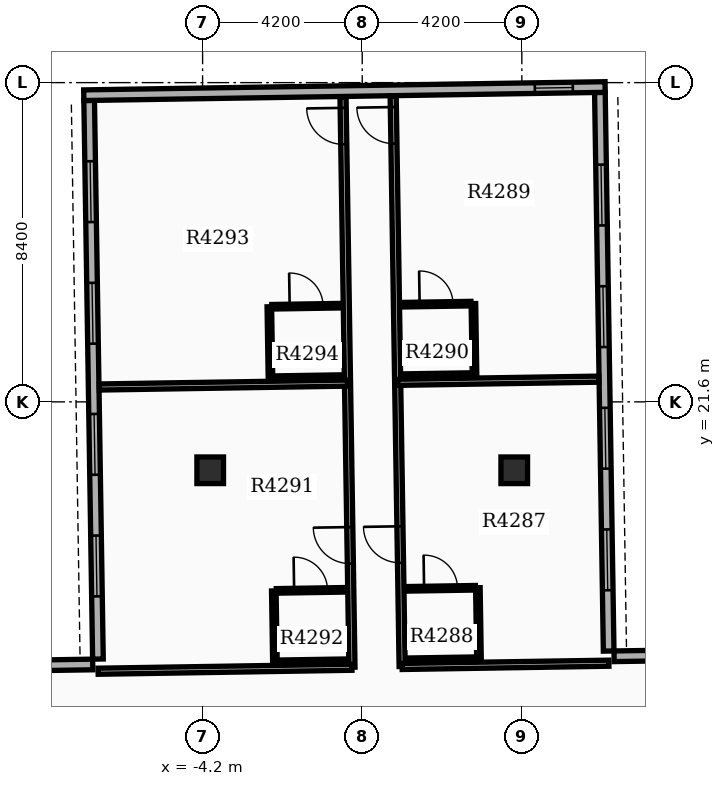
"""IFC4 building model, lengths in metres.
Left out: names, types, materials, properties, quantities, classifications, styles, units other than length and angle.
Written with IfcOpenShell. Run it as: python <this file> out.ifc"""

import sys

from ifc_helpers import new_model, si_unit, direction, frame, frame_2d, origin, origin_2d, place, context, subcontext, project, spatial, rectangle, extrude, element, fill, save


model = new_model("IFC4")
c1 = context("Model", 3, precision=1e-05, world=origin(), true_north=direction((0.0, 1.0)))
c2 = subcontext(c1, "Body", "Model", "MODEL_VIEW")
j1 = project(units=[si_unit("LENGTHUNIT", "METRE"), si_unit("PLANEANGLEUNIT", "RADIAN")], contexts=[c1])
p1 = place(None, origin())
s1 = spatial("IfcSite", under=j1, at=p1, CompositionType="ELEMENT")
p2 = place(p1, origin())
s2 = spatial("IfcBuilding", under=s1, at=p2, CompositionType="ELEMENT")
p3 = place(p2, frame((0.0, 0.0, 269.4)))
s3 = spatial("IfcBuildingStorey", under=s2, at=p3, CompositionType="ELEMENT", Elevation=269.4)
for number, where, z_axis, x_axis in (
    (1, (-4.0, 19.8, 0.0), (0.0, 0.0, 1.0), (1.0, 0.0, 0.0)),
    (2, (4.0, 19.8, 0.0), (0.0, 0.0, 1.0), (1.0, 0.0, 0.0)),
):
    element("IfcColumn", number, at=place(p3, frame(where, z_axis=z_axis, x_axis=x_axis)), inside=s3, PredefinedType="COLUMN", context=c2, shape_type="SweptSolid", body=[
        extrude(rectangle(XDim=0.7, YDim=0.7, at=origin_2d()), origin(), (0.0, 0.0, 1.0), 3.9),
    ])
p4 = place(p3, frame((6.485, 15.044, 0.0), z_axis=(0.0, 0.0, 1.0), x_axis=(-0.015711302158, 0.999876569875, 0.0)))
e3 = element("IfcWall", 3, at=p4, inside=s3, PredefinedType="STANDARD", context=c2, shape_type="SweptSolid", body=[
    extrude(rectangle(XDim=14.7, YDim=0.28, at=frame_2d((7.35, 0.0))), origin(), (0.0, 0.0, 1.0), 3.18),
])
p5 = place(p4, frame((1.6, 0.0, 0.8)))
e4 = element("IfcOpeningElement", 4, at=p5, cuts=e3, PredefinedType="OPENING", context=c2, shape_type="SweptSolid", body=[
    extrude(rectangle(XDim=1.6, YDim=1.7, at=frame_2d((0.8, 0.85))), frame((0.0, 0.15, 0.0), z_axis=(0.0, -1.0, 0.0), x_axis=(1.0, 0.0, 0.0)), (0.0, 0.0, 1.0), 0.3),
])
p6 = place(p4, frame((4.8, 0.0, 0.8)))
e5 = element("IfcOpeningElement", 5, at=p6, cuts=e3, PredefinedType="OPENING", context=c2, shape_type="SweptSolid", body=[
    extrude(rectangle(XDim=1.6, YDim=1.7, at=frame_2d((0.8, 0.85))), frame((0.0, 0.15, 0.0), z_axis=(0.0, -1.0, 0.0), x_axis=(1.0, 0.0, 0.0)), (0.0, 0.0, 1.0), 0.3),
])
p7 = place(p4, frame((8.0, 0.0, 0.8)))
e6 = element("IfcOpeningElement", 6, at=p7, cuts=e3, PredefinedType="OPENING", context=c2, shape_type="SweptSolid", body=[
    extrude(rectangle(XDim=1.6, YDim=1.7, at=frame_2d((0.8, 0.85))), frame((0.0, 0.15, 0.0), z_axis=(0.0, -1.0, 0.0), x_axis=(1.0, 0.0, 0.0)), (0.0, 0.0, 1.0), 0.3),
])
p8 = place(p4, frame((11.2, 0.0, 0.8)))
e7 = element("IfcOpeningElement", 7, at=p8, cuts=e3, PredefinedType="OPENING", context=c2, shape_type="SweptSolid", body=[
    extrude(rectangle(XDim=1.6, YDim=1.7, at=frame_2d((0.8, 0.85))), frame((0.0, 0.15, 0.0), z_axis=(0.0, -1.0, 0.0), x_axis=(1.0, 0.0, 0.0)), (0.0, 0.0, 1.0), 0.3),
])
p9 = place(p3, frame((-7.185, 29.531, 0.0), z_axis=(0.0, 0.0, 1.0), x_axis=(0.015711302158, -0.999876569875, 0.0)))
e8 = element("IfcWall", 8, at=p9, inside=s3, PredefinedType="STANDARD", context=c2, shape_type="SweptSolid", body=[
    extrude(rectangle(XDim=14.7, YDim=0.28, at=frame_2d((7.35, 0.0))), origin(), (0.0, 0.0, 1.0), 3.18),
])
p10 = place(p9, frame((1.6, 0.0, 0.8)))
e9 = element("IfcOpeningElement", 9, at=p10, cuts=e8, PredefinedType="OPENING", context=c2, shape_type="SweptSolid", body=[
    extrude(rectangle(XDim=1.6, YDim=1.7, at=frame_2d((0.8, 0.85))), frame((0.0, 0.15, 0.0), z_axis=(0.0, -1.0, 0.0), x_axis=(1.0, 0.0, 0.0)), (0.0, 0.0, 1.0), 0.3),
])
p11 = place(p9, frame((4.8, 0.0, 0.8)))
e10 = element("IfcOpeningElement", 10, at=p11, cuts=e8, PredefinedType="OPENING", context=c2, shape_type="SweptSolid", body=[
    extrude(rectangle(XDim=1.6, YDim=1.7, at=frame_2d((0.8, 0.85))), frame((0.0, 0.15, 0.0), z_axis=(0.0, -1.0, 0.0), x_axis=(1.0, 0.0, 0.0)), (0.0, 0.0, 1.0), 0.3),
])
p12 = place(p9, frame((8.25, 0.0, 0.8)))
e11 = element("IfcOpeningElement", 11, at=p12, cuts=e8, PredefinedType="OPENING", context=c2, shape_type="SweptSolid", body=[
    extrude(rectangle(XDim=1.6, YDim=1.7, at=frame_2d((0.8, 0.85))), frame((0.0, 0.15, 0.0), z_axis=(0.0, -1.0, 0.0), x_axis=(1.0, 0.0, 0.0)), (0.0, 0.0, 1.0), 0.3),
])
p13 = place(p9, frame((11.45, 0.0, 0.8)))
e12 = element("IfcOpeningElement", 12, at=p13, cuts=e8, PredefinedType="OPENING", context=c2, shape_type="SweptSolid", body=[
    extrude(rectangle(XDim=1.6, YDim=1.7, at=frame_2d((0.8, 0.85))), frame((0.0, 0.15, 0.0), z_axis=(0.0, -1.0, 0.0), x_axis=(1.0, 0.0, 0.0)), (0.0, 0.0, 1.0), 0.3),
])
p14 = place(p3, frame((6.391, 29.884, 0.0), z_axis=(0.0, 0.0, 1.0), x_axis=(-0.999876828887, -0.015694809807, 0.0)))
e13 = element("IfcWall", 13, at=p14, inside=s3, PredefinedType="STANDARD", context=c2, shape_type="SweptSolid", body=[
    extrude(rectangle(XDim=13.72, YDim=0.28, at=frame_2d((6.86, 0.0))), origin(), (0.0, 0.0, 1.0), 3.18),
])
p15 = place(p14, frame((0.85, 0.0, 0.85)))
e14 = element("IfcOpeningElement", 14, at=p15, cuts=e13, PredefinedType="OPENING", context=c2, shape_type="SweptSolid", body=[
    extrude(rectangle(XDim=1.0, YDim=1.5, at=frame_2d((0.5, 0.75))), frame((0.0, 0.15, 0.0), z_axis=(0.0, -1.0, 0.0), x_axis=(1.0, 0.0, 0.0)), (0.0, 0.0, 1.0), 0.3),
])
p16 = place(p3, frame((12.926, 15.005, 0.0), z_axis=(0.0, 0.0, 1.0), x_axis=(-0.999876823822, -0.015695132501, 0.0)))
e15 = element("IfcWall", 15, at=p16, inside=s3, PredefinedType="STANDARD", context=c2, shape_type="SweptSolid", body=[
    extrude(rectangle(XDim=6.3, YDim=0.28, at=frame_2d((3.15, 0.0))), origin(), (0.0, 0.0, 1.0), 3.18),
])
p17 = place(p3, frame((-13.391, 14.592, 0.0), z_axis=(0.0, 0.0, 1.0), x_axis=(0.999876833368, 0.015694524359, 0.0)))
e16 = element("IfcWall", 16, at=p17, inside=s3, PredefinedType="STANDARD", context=c2, shape_type="SweptSolid", body=[
    extrude(rectangle(XDim=6.3, YDim=0.28, at=frame_2d((3.15, 0.0))), origin(), (0.0, 0.0, 1.0), 3.18),
])
p18 = place(p3, frame((1.05, 14.638, 0.0), z_axis=(0.0, 0.0, 1.0), x_axis=(-0.015709976686, 0.999876590701, 0.0)))
e17 = element("IfcWall", 17, at=p18, inside=s3, PredefinedType="PARTITIONING", context=c2, shape_type="SweptSolid", body=[
    extrude(rectangle(XDim=15.012, YDim=0.16, at=frame_2d((7.506, 0.0))), origin(), (0.0, 0.0, 1.0), 3.17),
])
p19 = place(p18, frame((2.728, 0.0, 0.0)))
e18 = element("IfcOpeningElement", 18, at=p19, cuts=e17, PredefinedType="OPENING", context=c2, shape_type="SweptSolid", body=[
    extrude(rectangle(XDim=0.96, YDim=2.15, at=frame_2d((0.48, 1.075))), frame((0.0, 0.09, 0.0), z_axis=(0.0, -1.0, 0.0), x_axis=(1.0, 0.0, 0.0)), (0.0, 0.0, 1.0), 0.18),
])
p20 = place(p18, frame((13.76, 0.0, 0.0)))
e19 = element("IfcOpeningElement", 19, at=p20, cuts=e17, PredefinedType="OPENING", context=c2, shape_type="SweptSolid", body=[
    extrude(rectangle(XDim=0.96, YDim=2.15, at=frame_2d((0.48, 1.075))), frame((0.0, 0.09, 0.0), z_axis=(0.0, -1.0, 0.0), x_axis=(1.0, 0.0, 0.0)), (0.0, 0.0, 1.0), 0.18),
])
p21 = place(p3, frame((1.05, 14.638, 0.0), z_axis=(0.0, 0.0, 1.0), x_axis=(0.999876622965, 0.015707923068, 0.0)))
e20 = element("IfcWall", 20, at=p21, inside=s3, PredefinedType="PARTITIONING", context=c2, shape_type="SweptSolid", body=[
    extrude(rectangle(XDim=5.44, YDim=0.16, at=frame_2d((2.72, 0.0))), origin(), (0.0, 0.0, 1.0), 3.17),
])
p22 = place(p3, frame((0.933, 22.115, 0.0), z_axis=(0.0, 0.0, 1.0), x_axis=(0.999876970397, 0.015685791996, 0.0)))
e21 = element("IfcWall", 21, at=p22, inside=s3, PredefinedType="PARTITIONING", context=c2, shape_type="SweptSolid", body=[
    extrude(rectangle(XDim=5.292, YDim=0.16, at=frame_2d((2.646, 0.0))), origin(), (0.0, 0.0, 1.0), 3.17),
])
p23 = place(p3, frame((1.158, 16.68, 0.0), z_axis=(0.0, 0.0, 1.0), x_axis=(0.999876803258, 0.015696442504, 0.0)))
e22 = element("IfcWall", 22, at=p23, inside=s3, PredefinedType="PARTITIONING", context=c2, shape_type="SweptSolid", body=[
    extrude(rectangle(XDim=1.82, YDim=0.12, at=frame_2d((0.91, 0.0))), origin(), (0.0, 0.0, 1.0), 3.17),
])
p24 = place(p23, frame((0.47, 0.0, 0.0)))
e23 = element("IfcOpeningElement", 23, at=p24, cuts=e22, PredefinedType="OPENING", context=c2, shape_type="SweptSolid", body=[
    extrude(rectangle(XDim=0.88, YDim=2.1, at=frame_2d((0.44, 1.05))), frame((0.0, 0.07, 0.0), z_axis=(0.0, -1.0, 0.0), x_axis=(1.0, 0.0, 0.0)), (0.0, 0.0, 1.0), 0.14),
])
p25 = place(p3, frame((1.188, 14.801, 0.0), z_axis=(0.0, 0.0, 1.0), x_axis=(0.999876803258, 0.015696442504, 0.0)))
e24 = element("IfcWall", 24, at=p25, inside=s3, PredefinedType="PARTITIONING", context=c2, shape_type="SweptSolid", body=[
    extrude(rectangle(XDim=1.82, YDim=0.12, at=frame_2d((0.91, 0.0))), origin(), (0.0, 0.0, 1.0), 3.17),
])
p26 = place(p3, frame((3.073, 14.83, 0.0), z_axis=(0.0, 0.0, 1.0), x_axis=(-0.01571234584, 0.999876553475, 0.0)))
e25 = element("IfcWall", 25, at=p26, inside=s3, PredefinedType="PARTITIONING", context=c2, shape_type="SweptSolid", body=[
    extrude(rectangle(XDim=1.88, YDim=0.12, at=frame_2d((0.94, 0.0))), origin(), (0.0, 0.0, 1.0), 3.17),
])
p27 = place(p3, frame((1.041, 24.156, 0.0), z_axis=(0.0, 0.0, 1.0), x_axis=(0.999876836305, 0.015694337248, 0.0)))
e26 = element("IfcWall", 26, at=p27, inside=s3, PredefinedType="PARTITIONING", context=c2, shape_type="SweptSolid", body=[
    extrude(rectangle(XDim=1.82, YDim=0.12, at=frame_2d((0.91, 0.0))), origin(), (0.0, 0.0, 1.0), 3.17),
])
p28 = place(p27, frame((0.47, 0.0, 0.0)))
e27 = element("IfcOpeningElement", 27, at=p28, cuts=e26, PredefinedType="OPENING", context=c2, shape_type="SweptSolid", body=[
    extrude(rectangle(XDim=0.88, YDim=2.1, at=frame_2d((0.44, 1.05))), frame((0.0, 0.07, 0.0), z_axis=(0.0, -1.0, 0.0), x_axis=(1.0, 0.0, 0.0)), (0.0, 0.0, 1.0), 0.14),
])
p29 = place(p3, frame((1.07, 22.277, 0.0), z_axis=(0.0, 0.0, 1.0), x_axis=(0.999876803258, 0.015696442504, 0.0)))
e28 = element("IfcWall", 28, at=p29, inside=s3, PredefinedType="PARTITIONING", context=c2, shape_type="SweptSolid", body=[
    extrude(rectangle(XDim=1.82, YDim=0.12, at=frame_2d((0.91, 0.0))), origin(), (0.0, 0.0, 1.0), 3.17),
])
p30 = place(p3, frame((2.955, 22.306, 0.0), z_axis=(0.0, 0.0, 1.0), x_axis=(-0.015714386166, 0.99987652141, 0.0)))
e29 = element("IfcWall", 29, at=p30, inside=s3, PredefinedType="PARTITIONING", context=c2, shape_type="SweptSolid", body=[
    extrude(rectangle(XDim=1.88, YDim=0.12, at=frame_2d((0.94, 0.0))), origin(), (0.0, 0.0, 1.0), 3.17),
])
p31 = place(p3, frame((-0.27, 14.618, 0.0), z_axis=(0.0, 0.0, 1.0), x_axis=(-0.015726491309, 0.999876331089, 0.0)))
e30 = element("IfcWall", 30, at=p31, inside=s3, PredefinedType="PARTITIONING", context=c2, shape_type="SweptSolid", body=[
    extrude(rectangle(XDim=15.012, YDim=0.16, at=frame_2d((7.506, 0.0))), origin(), (0.0, 0.0, 1.0), 3.17),
])
p32 = place(p31, frame((2.728, 0.0, 0.0)))
e31 = element("IfcOpeningElement", 31, at=p32, cuts=e30, PredefinedType="OPENING", context=c2, shape_type="SweptSolid", body=[
    extrude(rectangle(XDim=0.96, YDim=2.15, at=frame_2d((0.48, 1.075))), frame((0.0, 0.09, 0.0), z_axis=(0.0, -1.0, 0.0), x_axis=(1.0, 0.0, 0.0)), (0.0, 0.0, 1.0), 0.18),
])
p33 = place(p31, frame((13.76, 0.0, 0.0)))
e32 = element("IfcOpeningElement", 32, at=p33, cuts=e30, PredefinedType="OPENING", context=c2, shape_type="SweptSolid", body=[
    extrude(rectangle(XDim=0.96, YDim=2.15, at=frame_2d((0.48, 1.075))), frame((0.0, 0.09, 0.0), z_axis=(0.0, -1.0, 0.0), x_axis=(1.0, 0.0, 0.0)), (0.0, 0.0, 1.0), 0.18),
])
p34 = place(p3, frame((-0.27, 14.618, 0.0), z_axis=(0.0, 0.0, 1.0), x_axis=(-0.999876502613, -0.015715582138, 0.0)))
e33 = element("IfcWall", 33, at=p34, inside=s3, PredefinedType="PARTITIONING", context=c2, shape_type="SweptSolid", body=[
    extrude(rectangle(XDim=6.68, YDim=0.16, at=frame_2d((3.34, 0.0))), origin(), (0.0, 0.0, 1.0), 3.17),
])
p35 = place(p3, frame((-0.387, 22.094, 0.0), z_axis=(0.0, 0.0, 1.0), x_axis=(-0.999876772323, -0.015698412933, 0.0)))
e34 = element("IfcWall", 34, at=p35, inside=s3, PredefinedType="PARTITIONING", context=c2, shape_type="SweptSolid", body=[
    extrude(rectangle(XDim=6.532, YDim=0.16, at=frame_2d((3.266, 0.0))), origin(), (0.0, 0.0, 1.0), 3.17),
])
p36 = place(p3, frame((-2.261, 16.626, 0.0), z_axis=(0.0, 0.0, 1.0), x_axis=(0.999876836305, 0.015694337248, 0.0)))
e35 = element("IfcWall", 35, at=p36, inside=s3, PredefinedType="PARTITIONING", context=c2, shape_type="SweptSolid", body=[
    extrude(rectangle(XDim=1.82, YDim=0.12, at=frame_2d((0.91, 0.0))), origin(), (0.0, 0.0, 1.0), 3.17),
])
p37 = place(p36, frame((0.47, 0.0, 0.0)))
e36 = element("IfcOpeningElement", 36, at=p37, cuts=e35, PredefinedType="OPENING", context=c2, shape_type="SweptSolid", body=[
    extrude(rectangle(XDim=0.88, YDim=2.1, at=frame_2d((0.44, 1.05))), frame((0.0, 0.07, 0.0), z_axis=(0.0, -1.0, 0.0), x_axis=(1.0, 0.0, 0.0)), (0.0, 0.0, 1.0), 0.14),
])
p38 = place(p3, frame((-2.232, 14.747, 0.0), z_axis=(0.0, 0.0, 1.0), x_axis=(0.999876836305, 0.015694337248, 0.0)))
e37 = element("IfcWall", 37, at=p38, inside=s3, PredefinedType="PARTITIONING", context=c2, shape_type="SweptSolid", body=[
    extrude(rectangle(XDim=1.82, YDim=0.12, at=frame_2d((0.91, 0.0))), origin(), (0.0, 0.0, 1.0), 3.17),
])
p39 = place(p3, frame((-2.297, 14.746, 0.0), z_axis=(0.0, 0.0, 1.0), x_axis=(-0.01571234584, 0.999876553475, 0.0)))
e38 = element("IfcWall", 38, at=p39, inside=s3, PredefinedType="PARTITIONING", context=c2, shape_type="SweptSolid", body=[
    extrude(rectangle(XDim=1.88, YDim=0.12, at=frame_2d((0.94, 0.0))), origin(), (0.0, 0.0, 1.0), 3.17),
])
p40 = place(p3, frame((-2.379, 24.103, 0.0), z_axis=(0.0, 0.0, 1.0), x_axis=(0.999876836305, 0.015694337248, 0.0)))
e39 = element("IfcWall", 39, at=p40, inside=s3, PredefinedType="PARTITIONING", context=c2, shape_type="SweptSolid", body=[
    extrude(rectangle(XDim=1.82, YDim=0.12, at=frame_2d((0.91, 0.0))), origin(), (0.0, 0.0, 1.0), 3.17),
])
p41 = place(p40, frame((0.47, 0.0, 0.0)))
e40 = element("IfcOpeningElement", 40, at=p41, cuts=e39, PredefinedType="OPENING", context=c2, shape_type="SweptSolid", body=[
    extrude(rectangle(XDim=0.88, YDim=2.1, at=frame_2d((0.44, 1.05))), frame((0.0, 0.07, 0.0), z_axis=(0.0, -1.0, 0.0), x_axis=(1.0, 0.0, 0.0)), (0.0, 0.0, 1.0), 0.14),
])
p42 = place(p3, frame((-2.349, 22.223, 0.0), z_axis=(0.0, 0.0, 1.0), x_axis=(0.999876836305, 0.015694337248, 0.0)))
e41 = element("IfcWall", 41, at=p42, inside=s3, PredefinedType="PARTITIONING", context=c2, shape_type="SweptSolid", body=[
    extrude(rectangle(XDim=1.82, YDim=0.12, at=frame_2d((0.91, 0.0))), origin(), (0.0, 0.0, 1.0), 3.17),
])
p43 = place(p3, frame((-2.414, 22.222, 0.0), z_axis=(0.0, 0.0, 1.0), x_axis=(-0.01571234584, 0.999876553475, 0.0)))
e42 = element("IfcWall", 42, at=p43, inside=s3, PredefinedType="PARTITIONING", context=c2, shape_type="SweptSolid", body=[
    extrude(rectangle(XDim=1.88, YDim=0.12, at=frame_2d((0.94, 0.0))), origin(), (0.0, 0.0, 1.0), 3.17),
])
p44 = place(p5, origin())
e43 = element("IfcWindow", 43, at=p44, inside=s3, PartitioningType="SINGLE_PANEL", PredefinedType="WINDOW", context=c2, shape_type="SweptSolid", body=[
    extrude(rectangle(XDim=1.6, YDim=1.7, at=frame_2d((0.8, 0.85))), frame((0.0, 0.03, 0.0), z_axis=(0.0, -1.0, 0.0), x_axis=(1.0, 0.0, 0.0)), (0.0, 0.0, 1.0), 0.06),
])
fill(e4, e43)
p45 = place(p6, origin())
e44 = element("IfcWindow", 44, at=p45, inside=s3, PartitioningType="SINGLE_PANEL", PredefinedType="WINDOW", context=c2, shape_type="SweptSolid", body=[
    extrude(rectangle(XDim=1.6, YDim=1.7, at=frame_2d((0.8, 0.85))), frame((0.0, 0.03, 0.0), z_axis=(0.0, -1.0, 0.0), x_axis=(1.0, 0.0, 0.0)), (0.0, 0.0, 1.0), 0.06),
])
fill(e5, e44)
p46 = place(p7, origin())
e45 = element("IfcWindow", 45, at=p46, inside=s3, PartitioningType="SINGLE_PANEL", PredefinedType="WINDOW", context=c2, shape_type="SweptSolid", body=[
    extrude(rectangle(XDim=1.6, YDim=1.7, at=frame_2d((0.8, 0.85))), frame((0.0, 0.03, 0.0), z_axis=(0.0, -1.0, 0.0), x_axis=(1.0, 0.0, 0.0)), (0.0, 0.0, 1.0), 0.06),
])
fill(e6, e45)
p47 = place(p8, origin())
e46 = element("IfcWindow", 46, at=p47, inside=s3, PartitioningType="SINGLE_PANEL", PredefinedType="WINDOW", context=c2, shape_type="SweptSolid", body=[
    extrude(rectangle(XDim=1.6, YDim=1.7, at=frame_2d((0.8, 0.85))), frame((0.0, 0.03, 0.0), z_axis=(0.0, -1.0, 0.0), x_axis=(1.0, 0.0, 0.0)), (0.0, 0.0, 1.0), 0.06),
])
fill(e7, e46)
p48 = place(p10, origin())
e47 = element("IfcWindow", 47, at=p48, inside=s3, PartitioningType="SINGLE_PANEL", PredefinedType="WINDOW", context=c2, shape_type="SweptSolid", body=[
    extrude(rectangle(XDim=1.6, YDim=1.7, at=frame_2d((0.8, 0.85))), frame((0.0, 0.03, 0.0), z_axis=(0.0, -1.0, 0.0), x_axis=(1.0, 0.0, 0.0)), (0.0, 0.0, 1.0), 0.06),
])
fill(e9, e47)
p49 = place(p11, origin())
e48 = element("IfcWindow", 48, at=p49, inside=s3, PartitioningType="SINGLE_PANEL", PredefinedType="WINDOW", context=c2, shape_type="SweptSolid", body=[
    extrude(rectangle(XDim=1.6, YDim=1.7, at=frame_2d((0.8, 0.85))), frame((0.0, 0.03, 0.0), z_axis=(0.0, -1.0, 0.0), x_axis=(1.0, 0.0, 0.0)), (0.0, 0.0, 1.0), 0.06),
])
fill(e10, e48)
p50 = place(p12, origin())
e49 = element("IfcWindow", 49, at=p50, inside=s3, PartitioningType="SINGLE_PANEL", PredefinedType="WINDOW", context=c2, shape_type="SweptSolid", body=[
    extrude(rectangle(XDim=1.6, YDim=1.7, at=frame_2d((0.8, 0.85))), frame((0.0, 0.03, 0.0), z_axis=(0.0, -1.0, 0.0), x_axis=(1.0, 0.0, 0.0)), (0.0, 0.0, 1.0), 0.06),
])
fill(e11, e49)
p51 = place(p13, origin())
e50 = element("IfcWindow", 50, at=p51, inside=s3, PartitioningType="SINGLE_PANEL", PredefinedType="WINDOW", context=c2, shape_type="SweptSolid", body=[
    extrude(rectangle(XDim=1.6, YDim=1.7, at=frame_2d((0.8, 0.85))), frame((0.0, 0.03, 0.0), z_axis=(0.0, -1.0, 0.0), x_axis=(1.0, 0.0, 0.0)), (0.0, 0.0, 1.0), 0.06),
])
fill(e12, e50)
p52 = place(p15, origin())
e51 = element("IfcWindow", 51, at=p52, inside=s3, PartitioningType="SINGLE_PANEL", PredefinedType="WINDOW", context=c2, shape_type="SweptSolid", body=[
    extrude(rectangle(XDim=1.0, YDim=1.5, at=frame_2d((0.5, 0.75))), frame((0.0, 0.03, 0.0), z_axis=(0.0, -1.0, 0.0), x_axis=(1.0, 0.0, 0.0)), (0.0, 0.0, 1.0), 0.06),
])
fill(e14, e51)
p53 = place(p19, origin())
e52 = element("IfcDoor", 52, at=p53, inside=s3, OperationType="SINGLE_SWING_RIGHT", PredefinedType="DOOR", context=c2, shape_type="SweptSolid", body=[
    extrude(rectangle(XDim=0.96, YDim=2.15, at=frame_2d((0.48, 1.075))), frame((0.0, 0.025, 0.0), z_axis=(0.0, -1.0, 0.0), x_axis=(1.0, 0.0, 0.0)), (0.0, 0.0, 1.0), 0.05),
])
fill(e18, e52)
p54 = place(p24, origin())
e53 = element("IfcDoor", 53, at=p54, inside=s3, OperationType="SINGLE_SWING_LEFT", PredefinedType="DOOR", context=c2, shape_type="SweptSolid", body=[
    extrude(rectangle(XDim=0.88, YDim=2.1, at=frame_2d((0.44, 1.05))), frame((0.0, 0.025, 0.0), z_axis=(0.0, -1.0, 0.0), x_axis=(1.0, 0.0, 0.0)), (0.0, 0.0, 1.0), 0.05),
])
fill(e23, e53)
p55 = place(p20, origin())
e54 = element("IfcDoor", 54, at=p55, inside=s3, OperationType="SINGLE_SWING_RIGHT", PredefinedType="DOOR", context=c2, shape_type="SweptSolid", body=[
    extrude(rectangle(XDim=0.96, YDim=2.15, at=frame_2d((0.48, 1.075))), frame((0.0, 0.025, 0.0), z_axis=(0.0, -1.0, 0.0), x_axis=(1.0, 0.0, 0.0)), (0.0, 0.0, 1.0), 0.05),
])
fill(e19, e54)
p56 = place(p28, origin())
e55 = element("IfcDoor", 55, at=p56, inside=s3, OperationType="SINGLE_SWING_LEFT", PredefinedType="DOOR", context=c2, shape_type="SweptSolid", body=[
    extrude(rectangle(XDim=0.88, YDim=2.1, at=frame_2d((0.44, 1.05))), frame((0.0, 0.025, 0.0), z_axis=(0.0, -1.0, 0.0), x_axis=(1.0, 0.0, 0.0)), (0.0, 0.0, 1.0), 0.05),
])
fill(e27, e55)
p57 = place(p32, origin())
e56 = element("IfcDoor", 56, at=p57, inside=s3, OperationType="SINGLE_SWING_RIGHT", PredefinedType="DOOR", context=c2, shape_type="SweptSolid", body=[
    extrude(rectangle(XDim=0.96, YDim=2.15, at=frame_2d((0.48, 1.075))), frame((0.0, 0.025, 0.0), z_axis=(0.0, -1.0, 0.0), x_axis=(1.0, 0.0, 0.0)), (0.0, 0.0, 1.0), 0.05),
])
fill(e31, e56)
p58 = place(p37, origin())
e57 = element("IfcDoor", 57, at=p58, inside=s3, OperationType="SINGLE_SWING_LEFT", PredefinedType="DOOR", context=c2, shape_type="SweptSolid", body=[
    extrude(rectangle(XDim=0.88, YDim=2.1, at=frame_2d((0.44, 1.05))), frame((0.0, 0.025, 0.0), z_axis=(0.0, -1.0, 0.0), x_axis=(1.0, 0.0, 0.0)), (0.0, 0.0, 1.0), 0.05),
])
fill(e36, e57)
p59 = place(p33, origin())
e58 = element("IfcDoor", 58, at=p59, inside=s3, OperationType="SINGLE_SWING_RIGHT", PredefinedType="DOOR", context=c2, shape_type="SweptSolid", body=[
    extrude(rectangle(XDim=0.96, YDim=2.15, at=frame_2d((0.48, 1.075))), frame((0.0, 0.025, 0.0), z_axis=(0.0, -1.0, 0.0), x_axis=(1.0, 0.0, 0.0)), (0.0, 0.0, 1.0), 0.05),
])
fill(e32, e58)
p60 = place(p41, origin())
e59 = element("IfcDoor", 59, at=p60, inside=s3, OperationType="SINGLE_SWING_LEFT", PredefinedType="DOOR", context=c2, shape_type="SweptSolid", body=[
    extrude(rectangle(XDim=0.88, YDim=2.1, at=frame_2d((0.44, 1.05))), frame((0.0, 0.025, 0.0), z_axis=(0.0, -1.0, 0.0), x_axis=(1.0, 0.0, 0.0)), (0.0, 0.0, 1.0), 0.05),
])
fill(e40, e59)
save(model, sys.argv[1])
